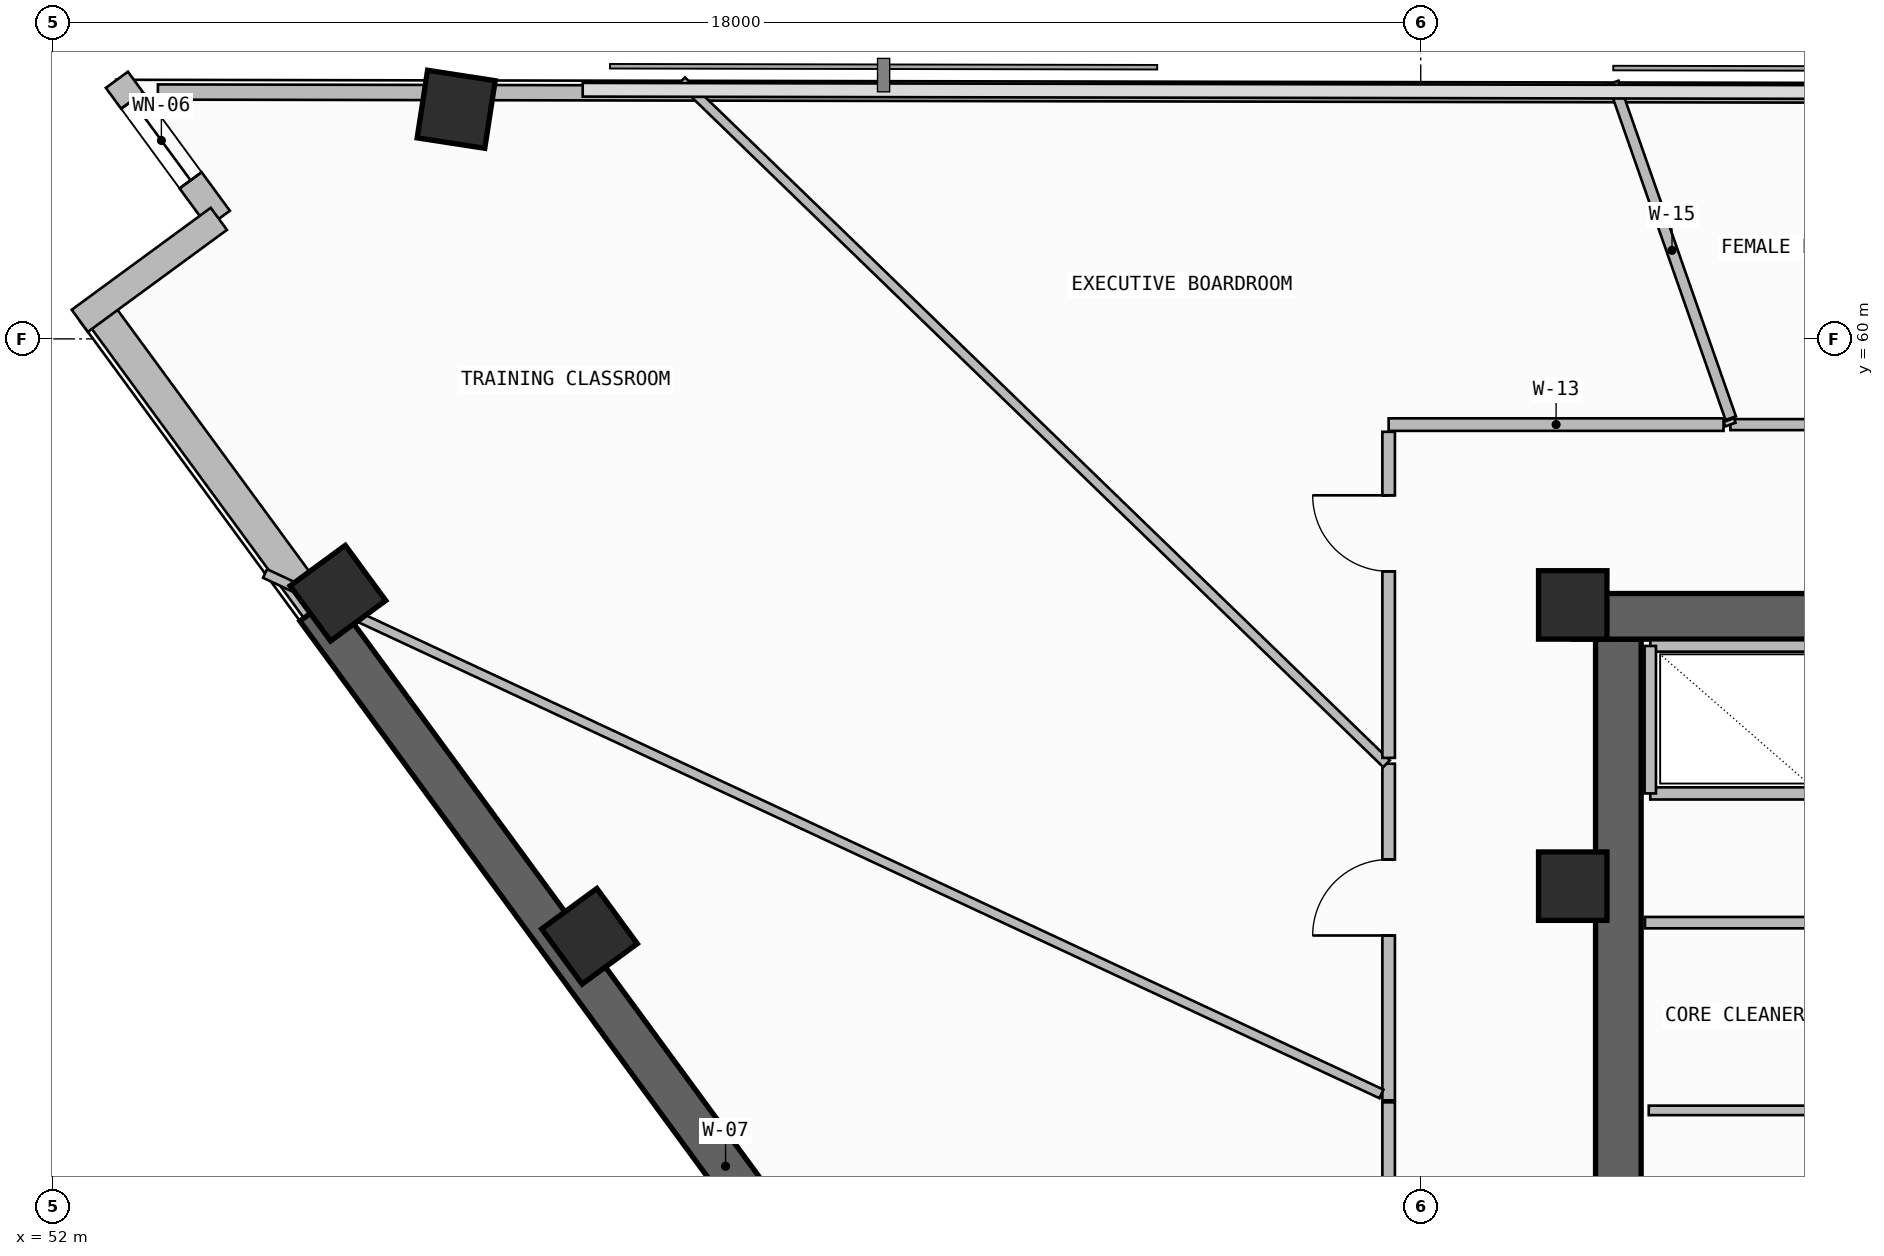
"""IFC4 building model, lengths in metres.
Left out: names, types, materials, properties, quantities, classifications, styles, units other than length and angle.
Written with IfcOpenShell. Run it as: python <this file> out.ifc"""

import sys

from ifc_helpers import new_model, si_unit, direction, frame, frame_2d, origin, origin_2d, place, context, subcontext, project, spatial, rectangle, extrude, element, fill, save


model = new_model("IFC4")
c1 = context("Model", 3, precision=1e-05, world=origin(), true_north=direction((0.0, 1.0)))
c2 = subcontext(c1, "Body", "Model", "MODEL_VIEW")
j1 = project(units=[si_unit("LENGTHUNIT", "METRE"), si_unit("PLANEANGLEUNIT", "RADIAN")], contexts=[c1])
p1 = place(None, origin())
s1 = spatial("IfcSite", under=j1, at=p1, CompositionType="ELEMENT")
p2 = place(p1, origin())
s2 = spatial("IfcBuilding", under=s1, at=p2, CompositionType="ELEMENT")
p3 = place(p2, frame((0.0, 0.0, 260.74)))
s3 = spatial("IfcBuildingStorey", under=s2, at=p3, CompositionType="ELEMENT", Elevation=260.74)
p4 = place(p3, frame((72.6, 43.35, -0.26), z_axis=(0.0, 0.0, 1.0), x_axis=(0.0, 1.0, 0.0)))
e1 = element("IfcWall", 1, at=p4, inside=s3, PredefinedType="SHEAR", context=c2, shape_type="SweptSolid", body=[
    extrude(rectangle(XDim=12.7, YDim=0.6, at=frame_2d((6.35, 0.0))), origin(), (0.0, 0.0, 1.0), 3.52),
])
p5 = place(p4, frame((1.35, 0.0, 0.26)))
e2 = element("IfcOpeningElement", 2, at=p5, cuts=e1, PredefinedType="OPENING", context=c2, shape_type="SweptSolid", body=[
    extrude(rectangle(XDim=1.2, YDim=2.2, at=frame_2d((0.6, 1.1))), frame((0.0, 0.31, 0.0), z_axis=(0.0, -1.0, 0.0), x_axis=(1.0, 0.0, 0.0)), (0.0, 0.0, 1.0), 0.62),
])
p6 = place(p3, frame((72.0, 56.35, -0.26), z_axis=(0.0, 0.0, 1.0), x_axis=(1.0, 0.0, 0.0)))
e3 = element("IfcWall", 3, at=p6, inside=s3, PredefinedType="SHEAR", context=c2, shape_type="SweptSolid", body=[
    extrude(rectangle(XDim=13.6, YDim=0.6, at=frame_2d((6.8, 0.0))), origin(), (0.0, 0.0, 1.0), 3.52),
])
for number, where, z_axis, x_axis in (
    (4, (72.0, 52.8, 0.0), (0.0, 0.0, 1.0), (1.0, 0.0, 0.0)),
    (5, (72.0, 56.5, 0.0), (0.0, 0.0, 1.0), (1.0, 0.0, 0.0)),
    (6, (57.309, 63.021, 0.0), (0.0, 0.0, 1.0), (0.152, 0.988, 0.0)),
    (7, (55.753, 56.654, 0.0), (0.0, 0.0, 1.0), (-0.591, 0.806, 0.0)),
    (8, (59.063, 52.14, 0.0), (0.0, 0.0, 1.0), (-0.591, 0.806, 0.0)),
):
    element("IfcColumn", number, at=place(p3, frame(where, z_axis=z_axis, x_axis=x_axis)), inside=s3, PredefinedType="COLUMN", context=c2, shape_type="SweptSolid", body=[
        extrude(rectangle(XDim=0.9, YDim=0.9, at=origin_2d()), origin(), (0.0, 0.0, 1.0), 3.52),
    ])
p7 = place(p3, frame((52.579, 60.4, 0.0), z_axis=(0.0, 0.0, 1.0), x_axis=(0.591311800505, -0.806443026248, 0.0)))
e9 = element("IfcWall", 9, at=p7, inside=s3, PredefinedType="SOLIDWALL", context=c2, shape_type="SweptSolid", body=[
    extrude(rectangle(XDim=4.898, YDim=0.42, at=frame_2d((2.449, 0.0))), origin(), (0.0, 0.0, 1.0), 2.237),
])
p8 = place(p3, frame((55.475, 56.45, -0.26), z_axis=(0.0, 0.0, 1.0), x_axis=(0.591309555876, -0.806444672082, 0.0)))
e10 = element("IfcWall", 10, at=p8, inside=s3, PredefinedType="SHEAR", context=c2, shape_type="SweptSolid", body=[
    extrude(rectangle(XDim=18.192, YDim=0.55, at=frame_2d((9.096, 0.0))), origin(), (0.0, 0.0, 1.0), 3.52),
])
p9 = place(p3, frame((52.845, 63.409, 0.0), z_axis=(0.0, 0.0, 1.0), x_axis=(0.591251685745, -0.806487101015, 0.0)))
e11 = element("IfcWall", 11, at=p9, inside=s3, PredefinedType="SOLIDWALL", context=c2, shape_type="SweptSolid", body=[
    extrude(rectangle(XDim=2.269, YDim=0.36, at=frame_2d((1.134, 0.0))), origin(), (0.0, 0.0, 1.0), 3.26),
])
p10 = place(p9, frame((0.34, 0.0, 0.45)))
e12 = element("IfcOpeningElement", 12, at=p10, cuts=e11, PredefinedType="OPENING", context=c2, shape_type="SweptSolid", body=[
    extrude(rectangle(XDim=1.3, YDim=2.4, at=frame_2d((0.65, 1.2))), frame((0.0, 0.19, 0.0), z_axis=(0.0, -1.0, 0.0), x_axis=(1.0, 0.0, 0.0)), (0.0, 0.0, 1.0), 0.38),
])
p11 = place(p3, frame((54.187, 61.579, 0.0), z_axis=(0.0, 0.0, 1.0), x_axis=(-0.806449475274, -0.591303005092, 0.0)))
e13 = element("IfcWall", 13, at=p11, inside=s3, PredefinedType="SOLIDWALL", context=c2, shape_type="SweptSolid", body=[
    extrude(rectangle(XDim=2.268, YDim=0.36, at=frame_2d((1.134, 0.0))), origin(), (0.0, 0.0, 1.0), 3.26),
])
p12 = place(p3, frame((83.332, 63.193, 0.0), z_axis=(0.0, 0.0, 1.0), x_axis=(-0.999998363757, 0.001809000383, 0.0)))
e14 = element("IfcWall", 14, at=p12, inside=s3, PredefinedType="PARAPET", context=c2, shape_type="SweptSolid", body=[
    extrude(rectangle(XDim=25.777, YDim=0.2, at=frame_2d((12.889, 0.0))), origin(), (0.0, 0.0, 1.0), 1.15),
])
p13 = place(p3, frame((57.064, 63.241, 0.0), z_axis=(0.0, 0.0, 1.0), x_axis=(-0.999998274159, 0.001857869529, 0.0)))
e15 = element("IfcWall", 15, at=p13, inside=s3, PredefinedType="PARAPET", context=c2, shape_type="SweptSolid", body=[
    extrude(rectangle(XDim=3.679, YDim=0.2, at=frame_2d((1.84, 0.0))), origin(), (0.0, 0.0, 1.0), 1.15),
])
p14 = place(p3, frame((72.95, 52.32, 0.0), z_axis=(0.0, 0.0, 1.0), x_axis=(1.0, 0.0, 0.0)))
e16 = element("IfcWall", 16, at=p14, inside=s3, PredefinedType="SOLIDWALL", context=c2, shape_type="SweptSolid", body=[
    extrude(rectangle(XDim=3.33, YDim=0.15, at=frame_2d((1.665, 0.0))), origin(), (0.0, 0.0, 1.0), 3.26),
])
p15 = place(p3, frame((73.0, 49.85, 0.0), z_axis=(0.0, 0.0, 1.0), x_axis=(1.0, 0.0, 0.0)))
e17 = element("IfcWall", 17, at=p15, inside=s3, PredefinedType="PARTITIONING", context=c2, shape_type="SweptSolid", body=[
    extrude(rectangle(XDim=3.28, YDim=0.125, at=frame_2d((1.64, 0.0))), origin(), (0.0, 0.0, 1.0), 3.26),
])
p16 = place(p3, frame((73.02, 54.02, 0.0), z_axis=(0.0, 0.0, 1.0), x_axis=(1.0, 0.0, 0.0)))
e18 = element("IfcWall", 18, at=p16, inside=s3, PredefinedType="SOLIDWALL", context=c2, shape_type="SweptSolid", body=[
    extrude(rectangle(XDim=12.08, YDim=0.16, at=frame_2d((6.04, 0.0))), origin(), (0.0, 0.0, 1.0), 3.26),
])
p17 = place(p16, frame((4.03, 0.0, 0.0)))
e19 = element("IfcOpeningElement", 19, at=p17, cuts=e18, PredefinedType="OPENING", context=c2, shape_type="SweptSolid", body=[
    extrude(rectangle(XDim=1.1, YDim=2.25, at=frame_2d((0.55, 1.125))), frame((0.0, 0.09, 0.0), z_axis=(0.0, -1.0, 0.0), x_axis=(1.0, 0.0, 0.0)), (0.0, 0.0, 1.0), 0.18),
])
p18 = place(p16, frame((6.28, 0.0, 0.0)))
e20 = element("IfcOpeningElement", 20, at=p18, cuts=e18, PredefinedType="OPENING", context=c2, shape_type="SweptSolid", body=[
    extrude(rectangle(XDim=1.1, YDim=2.25, at=frame_2d((0.55, 1.125))), frame((0.0, 0.09, 0.0), z_axis=(0.0, -1.0, 0.0), x_axis=(1.0, 0.0, 0.0)), (0.0, 0.0, 1.0), 0.18),
])
p19 = place(p16, frame((8.53, 0.0, 0.0)))
e21 = element("IfcOpeningElement", 21, at=p19, cuts=e18, PredefinedType="OPENING", context=c2, shape_type="SweptSolid", body=[
    extrude(rectangle(XDim=1.1, YDim=2.25, at=frame_2d((0.55, 1.125))), frame((0.0, 0.09, 0.0), z_axis=(0.0, -1.0, 0.0), x_axis=(1.0, 0.0, 0.0)), (0.0, 0.0, 1.0), 0.18),
])
p20 = place(p3, frame((73.02, 55.96, 0.0), z_axis=(0.0, 0.0, 1.0), x_axis=(1.0, 0.0, 0.0)))
e22 = element("IfcWall", 22, at=p20, inside=s3, PredefinedType="SOLIDWALL", context=c2, shape_type="SweptSolid", body=[
    extrude(rectangle(XDim=3.5, YDim=0.15, at=frame_2d((1.75, 0.0))), origin(), (0.0, 0.0, 1.0), 3.26),
])
p21 = place(p3, frame((73.02, 54.02, 0.0), z_axis=(0.0, 0.0, 1.0), x_axis=(0.0, 1.0, 0.0)))
e23 = element("IfcWall", 23, at=p21, inside=s3, PredefinedType="PLUMBINGWALL", context=c2, shape_type="SweptSolid", body=[
    extrude(rectangle(XDim=1.94, YDim=0.15, at=frame_2d((0.97, 0.0))), origin(), (0.0, 0.0, 1.0), 3.26),
])
p22 = place(p3, frame((77.265, 58.872, 0.0), z_axis=(0.0, 0.0, 1.0), x_axis=(-1.0, 0.0, 0.0)))
e24 = element("IfcWall", 24, at=p22, inside=s3, PredefinedType="PARTITIONING", context=c2, shape_type="SweptSolid", body=[
    extrude(rectangle(XDim=3.192, YDim=0.145, at=frame_2d((1.596, 0.0))), origin(), (0.0, 0.0, 1.0), 3.26),
])
p23 = place(p3, frame((74.074, 58.872, 0.0), z_axis=(0.0, 0.0, 1.0), x_axis=(-0.338039253159, 0.941132011635, 0.0)))
e25 = element("IfcWall", 25, at=p23, inside=s3, PredefinedType="PARTITIONING", context=c2, shape_type="SweptSolid", body=[
    extrude(rectangle(XDim=0.063, YDim=0.145, at=frame_2d((0.032, 0.0))), origin(), (0.0, 0.0, 1.0), 3.26),
])
p24 = place(p3, frame((74.079, 58.957, 0.0), z_axis=(0.0, 0.0, 1.0), x_axis=(-0.330266744541, 0.943887640268, 0.0)))
e26 = element("IfcWall", 26, at=p24, inside=s3, PredefinedType="PARTITIONING", context=c2, shape_type="SweptSolid", body=[
    extrude(rectangle(XDim=4.678, YDim=0.145, at=frame_2d((2.339, 0.0))), origin(), (0.0, 0.0, 1.0), 3.26),
])
p25 = place(p3, frame((69.578, 54.411, 0.0), z_axis=(0.0, 0.0, 1.0), x_axis=(0.0, -1.0, 0.0)))
e27 = element("IfcWall", 27, at=p25, inside=s3, PredefinedType="PARTITIONING", context=c2, shape_type="SweptSolid", body=[
    extrude(rectangle(XDim=4.428, YDim=0.165, at=frame_2d((2.214, 0.0))), origin(), (0.0, 0.0, 1.0), 2.237),
])
p26 = place(p25, frame((1.26, 0.0, 0.0)))
e28 = element("IfcOpeningElement", 28, at=p26, cuts=e27, PredefinedType="OPENING", context=c2, shape_type="SweptSolid", body=[
    extrude(rectangle(XDim=1.0, YDim=2.2, at=frame_2d((0.5, 1.1))), frame((0.0, 0.093, 0.0), z_axis=(0.0, -1.0, 0.0), x_axis=(1.0, 0.0, 0.0)), (0.0, 0.0, 1.0), 0.185),
])
p27 = place(p3, frame((60.275, 63.395, 0.0), z_axis=(0.0, 0.0, 1.0), x_axis=(0.718266500505, -0.695768089418, 0.0)))
e29 = element("IfcWall", 29, at=p27, inside=s3, PredefinedType="PARTITIONING", context=c2, shape_type="SweptSolid", body=[
    extrude(rectangle(XDim=12.913, YDim=0.125, at=frame_2d((6.457, 0.0))), origin(), (0.0, 0.0, 1.0), 2.237),
])
p28 = place(p3, frame((69.483, 50.066, 0.0), z_axis=(0.0, 0.0, 1.0), x_axis=(-0.906367788561, 0.422489564202, 0.0)))
e30 = element("IfcWall", 30, at=p28, inside=s3, PredefinedType="PARTITIONING", context=c2, shape_type="SweptSolid", body=[
    extrude(rectangle(XDim=16.206, YDim=0.125, at=frame_2d((8.103, 0.0))), origin(), (0.0, 0.0, 1.0), 2.237),
])
p29 = place(p3, frame((73.984, 58.872, 0.0), z_axis=(0.0, 0.0, 1.0), x_axis=(-1.0, 0.0, 0.0)))
e31 = element("IfcWall", 31, at=p29, inside=s3, PredefinedType="PARTITIONING", context=c2, shape_type="SweptSolid", body=[
    extrude(rectangle(XDim=4.406, YDim=0.165, at=frame_2d((2.203, 0.0))), origin(), (0.0, 0.0, 1.0), 3.26),
])
p30 = place(p3, frame((69.578, 58.778, 0.0), z_axis=(0.0, 0.0, 1.0), x_axis=(0.0, -1.0, 0.0)))
e32 = element("IfcWall", 32, at=p30, inside=s3, PredefinedType="PARTITIONING", context=c2, shape_type="SweptSolid", body=[
    extrude(rectangle(XDim=4.29, YDim=0.165, at=frame_2d((2.145, 0.0))), origin(), (0.0, 0.0, 1.0), 2.237),
])
p31 = place(p30, frame((0.836, 0.0, 0.0)))
e33 = element("IfcOpeningElement", 33, at=p31, cuts=e32, PredefinedType="OPENING", context=c2, shape_type="SweptSolid", body=[
    extrude(rectangle(XDim=1.0, YDim=2.2, at=frame_2d((0.5, 1.1))), frame((0.0, 0.093, 0.0), z_axis=(0.0, -1.0, 0.0), x_axis=(1.0, 0.0, 0.0)), (0.0, 0.0, 1.0), 0.185),
])
p32 = place(p3, frame((69.578, 49.956, 0.0), z_axis=(0.0, 0.0, 1.0), x_axis=(0.0, -1.0, 0.0)))
e34 = element("IfcWall", 34, at=p32, inside=s3, PredefinedType="PARTITIONING", context=c2, shape_type="SweptSolid", body=[
    extrude(rectangle(XDim=7.636, YDim=0.165, at=frame_2d((3.818, 0.0))), origin(), (0.0, 0.0, 1.0), 3.26),
])
p33 = place(p32, frame((3.318, 0.0, 0.0)))
e35 = element("IfcOpeningElement", 35, at=p33, cuts=e34, PredefinedType="OPENING", context=c2, shape_type="SweptSolid", body=[
    extrude(rectangle(XDim=1.0, YDim=2.2, at=frame_2d((0.5, 1.1))), frame((0.0, 0.093, 0.0), z_axis=(0.0, -1.0, 0.0), x_axis=(1.0, 0.0, 0.0)), (0.0, 0.0, 1.0), 0.185),
])
p34 = place(p10, origin())
e36 = element("IfcWindow", 36, at=p34, inside=s3, PartitioningType="SINGLE_PANEL", PredefinedType="WINDOW", context=c2, shape_type="SweptSolid", body=[
    extrude(rectangle(XDim=1.3, YDim=2.4, at=frame_2d((0.65, 1.2))), frame((0.0, 0.03, 0.0), z_axis=(0.0, -1.0, 0.0), x_axis=(1.0, 0.0, 0.0)), (0.0, 0.0, 1.0), 0.06),
])
fill(e12, e36)
p35 = place(p26, frame((1.0, 0.0, 0.0), z_axis=(0.0, 0.0, 1.0), x_axis=(-1.0, 0.0, 0.0)))
e37 = element("IfcDoor", 37, at=p35, inside=s3, OperationType="SINGLE_SWING_LEFT", PredefinedType="DOOR", context=c2, shape_type="SweptSolid", body=[
    extrude(rectangle(XDim=1.0, YDim=2.2, at=frame_2d((0.5, 1.1))), frame((0.0, 0.025, 0.0), z_axis=(0.0, -1.0, 0.0), x_axis=(1.0, 0.0, 0.0)), (0.0, 0.0, 1.0), 0.05),
])
fill(e28, e37)
p36 = place(p31, frame((1.0, 0.0, 0.0), z_axis=(0.0, 0.0, 1.0), x_axis=(-1.0, 0.0, 0.0)))
e38 = element("IfcDoor", 38, at=p36, inside=s3, OperationType="SINGLE_SWING_RIGHT", PredefinedType="DOOR", context=c2, shape_type="SweptSolid", body=[
    extrude(rectangle(XDim=1.0, YDim=2.2, at=frame_2d((0.5, 1.1))), frame((0.0, 0.025, 0.0), z_axis=(0.0, -1.0, 0.0), x_axis=(1.0, 0.0, 0.0)), (0.0, 0.0, 1.0), 0.05),
])
fill(e33, e38)
save(model, sys.argv[1])
